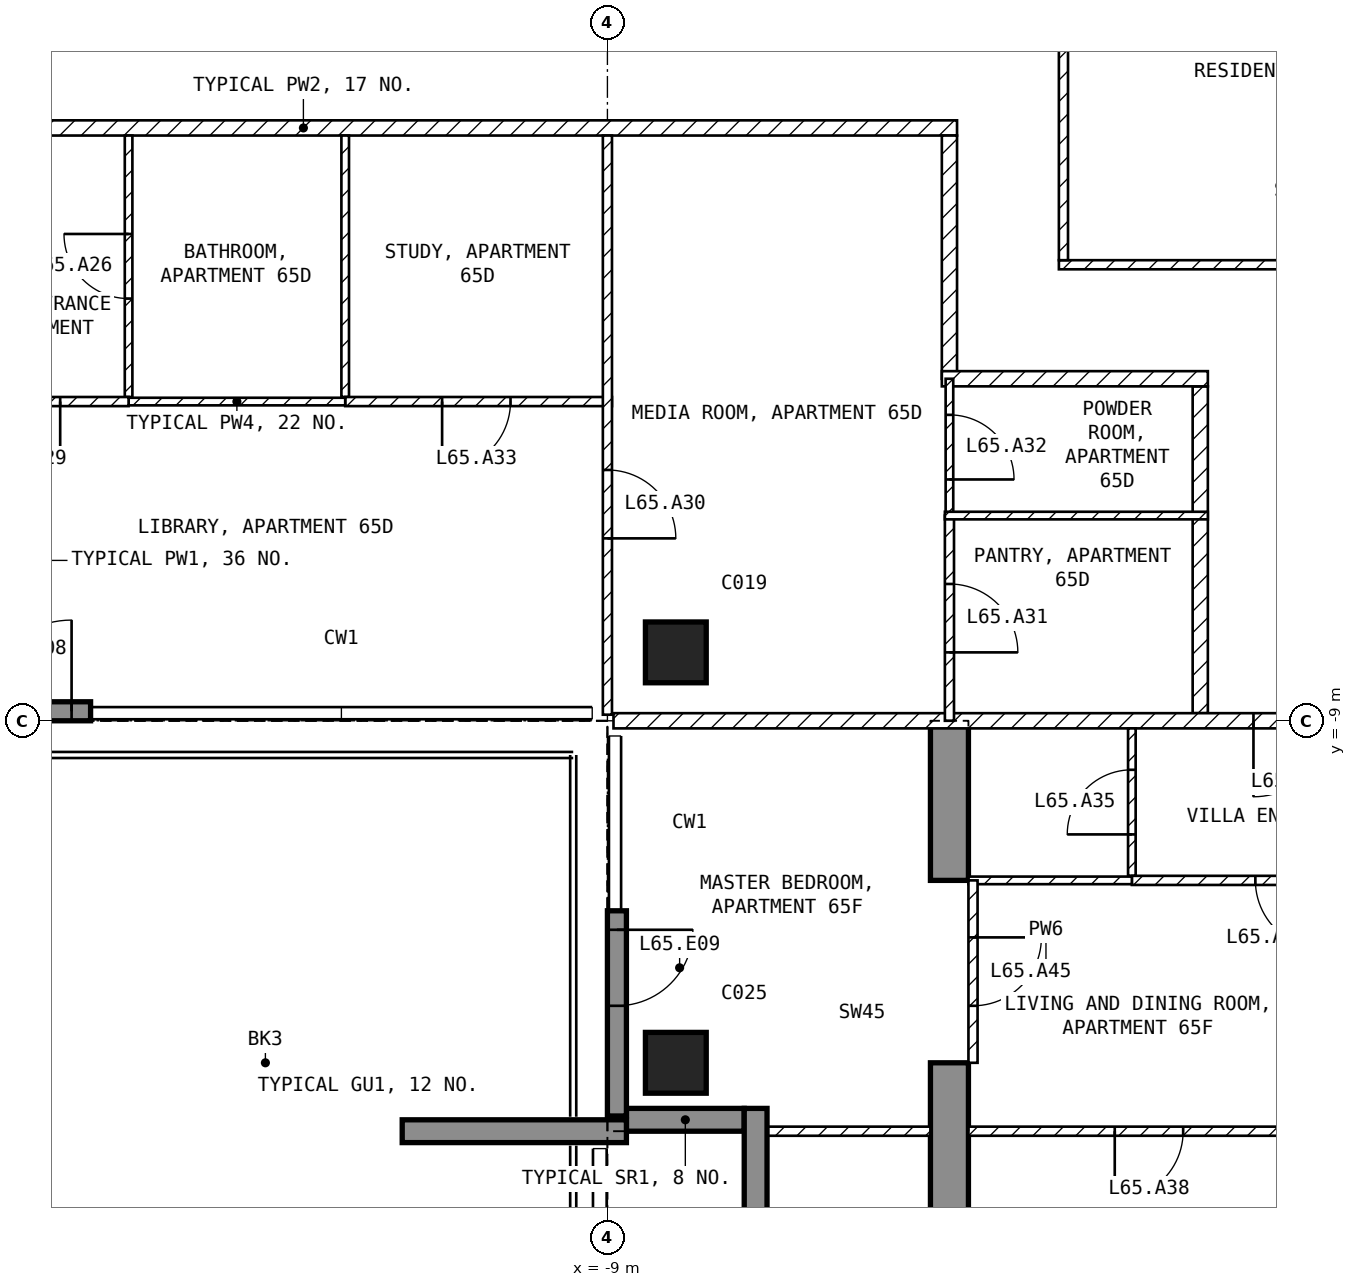
"""IFC4 building model, lengths in metres.
Left out: names, types, materials, properties, quantities, classifications, styles, units other than length and angle.
Written with IfcOpenShell. Run it as: python <this file> out.ifc"""

import sys

from ifc_helpers import new_model, si_unit, direction, frame, frame_2d, origin, origin_2d, place, context, subcontext, project, spatial, polyline, rectangle, outline, extrude, element, fill, save


model = new_model("IFC4")
c1 = context("Model", 3, precision=1e-05, world=origin(), true_north=direction((0.0, 1.0)))
c2 = subcontext(c1, "Body", "Model", "MODEL_VIEW")
j1 = project(units=[si_unit("LENGTHUNIT", "METRE"), si_unit("PLANEANGLEUNIT", "RADIAN")], contexts=[c1])
p1 = place(None, origin())
s1 = spatial("IfcSite", under=j1, at=p1, CompositionType="ELEMENT")
p2 = place(p1, origin())
s2 = spatial("IfcBuilding", under=s1, at=p2, CompositionType="ELEMENT")
p3 = place(p2, frame((0.0, 0.0, 257.0)))
s3 = spatial("IfcBuildingStorey", under=s2, at=p3, CompositionType="ELEMENT", Elevation=257.0)
for number, where, z_axis, x_axis in (
    (1, (-8.1, -13.5, -0.25), (0.0, 0.0, 1.0), (1.0, 0.0, 0.0)),
    (2, (-8.1, -8.1, -0.25), (0.0, 0.0, 1.0), (1.0, 0.0, 0.0)),
):
    element("IfcColumn", number, at=place(p3, frame(where, z_axis=z_axis, x_axis=x_axis)), inside=s3, PredefinedType="COLUMN", context=c2, shape_type="SweptSolid", body=[
        extrude(rectangle(XDim=0.8, YDim=0.8, at=origin_2d()), origin(), (0.0, 0.0, 1.0), 3.5),
    ])
p4 = place(p3, frame((-4.75, -16.7, -0.25), z_axis=(1.0, 0.0, 0.0), x_axis=(0.0, 1.0, 0.0)))
e3 = element("IfcWall", 3, at=p4, inside=s3, PredefinedType="SHEAR", context=c2, shape_type="SweptSolid", body=[
    extrude(outline(polyline([(0.0, 0.0), (3.2, 0.0), (3.2, 2.65), (5.6, 2.65), (5.6, 0.0), (7.7, 0.0), (7.7, 3.5), (0.0, 3.5), (0.0, 0.0)])), origin(), (0.0, 0.0, 1.0), 0.5),
])
p5 = place(p3, frame((-17.94, -8.875, 0.0), z_axis=(0.0, 0.0, 1.0), x_axis=(1.0, 0.0, 0.0)))
e4 = element("IfcWall", 4, at=p5, inside=s3, PredefinedType="SOLIDWALL", context=c2, shape_type="SweptSolid", body=[
    extrude(rectangle(XDim=2.14, YDim=0.25, at=frame_2d((1.07, 0.0))), origin(), (0.0, 0.0, 1.0), 3.25),
])
p6 = place(p5, frame((0.69, 0.0, 0.0)))
e5 = element("IfcOpeningElement", 5, at=p6, cuts=e4, PredefinedType="OPENING", context=c2, shape_type="SweptSolid", body=[
    extrude(rectangle(XDim=1.2, YDim=2.4, at=frame_2d((0.6, 1.2))), frame((0.0, 0.135, 0.0), z_axis=(0.0, -1.0, 0.0), x_axis=(1.0, 0.0, 0.0)), (0.0, 0.0, 1.0), 0.27),
])
p7 = place(p3, frame((-8.875, -11.5, 0.0), z_axis=(0.0, 0.0, 1.0), x_axis=(0.0, -1.0, 0.0)))
e6 = element("IfcWall", 6, at=p7, inside=s3, PredefinedType="SOLIDWALL", context=c2, shape_type="SweptSolid", body=[
    extrude(rectangle(XDim=2.7, YDim=0.25, at=frame_2d((1.35, 0.0))), origin(), (0.0, 0.0, 1.0), 3.25),
])
p8 = place(p7, frame((0.25, 0.0, 0.0)))
e7 = element("IfcOpeningElement", 7, at=p8, cuts=e6, PredefinedType="OPENING", context=c2, shape_type="SweptSolid", body=[
    extrude(rectangle(XDim=1.0, YDim=2.4, at=frame_2d((0.5, 1.2))), frame((0.0, 0.135, 0.0), z_axis=(0.0, -1.0, 0.0), x_axis=(1.0, 0.0, 0.0)), (0.0, 0.0, 1.0), 0.27),
])
p9 = place(p3, frame((-8.75, -14.25, 0.0), z_axis=(0.0, 0.0, 1.0), x_axis=(1.0, 0.0, 0.0)))
e8 = element("IfcWall", 8, at=p9, inside=s3, PredefinedType="SOLIDWALL", context=c2, shape_type="SweptSolid", body=[
    extrude(rectangle(XDim=1.55, YDim=0.3, at=frame_2d((0.775, 0.0))), origin(), (0.0, 0.0, 1.0), 3.25),
])
p10 = place(p3, frame((-7.05, -14.1, 0.0), z_axis=(0.0, 0.0, 1.0), x_axis=(0.0, -1.0, 0.0)))
e9 = element("IfcWall", 9, at=p10, inside=s3, PredefinedType="SOLIDWALL", context=c2, shape_type="SweptSolid", body=[
    extrude(rectangle(XDim=1.8, YDim=0.3, at=frame_2d((0.9, 0.0))), origin(), (0.0, 0.0, 1.0), 3.25),
])
p11 = place(p3, frame((-8.75, -14.4, 0.0), z_axis=(0.0, 0.0, 1.0), x_axis=(-1.0, 0.0, 0.0)))
e10 = element("IfcWall", 10, at=p11, inside=s3, PredefinedType="SOLIDWALL", context=c2, shape_type="SweptSolid", body=[
    extrude(rectangle(XDim=2.95, YDim=0.3, at=frame_2d((1.475, 0.0))), origin(), (0.0, 0.0, 1.0), 3.25),
])
p12 = place(p3, frame((-3.06, -3.0, 0.0), z_axis=(0.0, 0.0, 1.0), x_axis=(1.0, 0.0, 0.0)))
e11 = element("IfcWall", 11, at=p12, inside=s3, PredefinedType="PARTITIONING", context=c2, shape_type="SweptSolid", body=[
    extrude(rectangle(XDim=6.12, YDim=0.12, at=frame_2d((3.06, 0.0))), origin(), (0.0, 0.0, 1.0), 3.25),
])
p13 = place(p3, frame((-3.0, 2.94, 0.0), z_axis=(0.0, 0.0, 1.0), x_axis=(0.0, -1.0, 0.0)))
e12 = element("IfcWall", 12, at=p13, inside=s3, PredefinedType="PARTITIONING", context=c2, shape_type="SweptSolid", body=[
    extrude(rectangle(XDim=5.88, YDim=0.12, at=frame_2d((2.94, 0.0))), origin(), (0.0, 0.0, 1.0), 3.25),
])
p14 = place(p3, frame((-4.4, -1.2, 0.0), z_axis=(0.0, 0.0, 1.0), x_axis=(-1.0, 0.0, 0.0)))
e13 = element("IfcWall", 13, at=p14, inside=s3, PredefinedType="PARTITIONING", context=c2, shape_type="SweptSolid", body=[
    extrude(rectangle(XDim=17.2, YDim=0.2, at=frame_2d((8.6, 0.0))), origin(), (0.0, 0.0, 1.0), 3.25),
])
p15 = place(p14, frame((12.05, 0.0, 0.0)))
e14 = element("IfcOpeningElement", 14, at=p15, cuts=e13, PredefinedType="OPENING", context=c2, shape_type="SweptSolid", body=[
    extrude(rectangle(XDim=1.0, YDim=2.1, at=frame_2d((0.5, 1.05))), frame((0.0, 0.11, 0.0), z_axis=(0.0, -1.0, 0.0), x_axis=(1.0, 0.0, 0.0)), (0.0, 0.0, 1.0), 0.22),
])
p16 = place(p3, frame((-4.5, -4.5, 0.0), z_axis=(0.0, 0.0, 1.0), x_axis=(0.0, 1.0, 0.0)))
e15 = element("IfcWall", 15, at=p16, inside=s3, PredefinedType="PARTITIONING", context=c2, shape_type="SweptSolid", body=[
    extrude(rectangle(XDim=3.2, YDim=0.2, at=frame_2d((1.6, 0.0))), origin(), (0.0, 0.0, 1.0), 3.25),
])
p17 = place(p3, frame((-1.2, -8.9, 0.0), z_axis=(0.0, 0.0, 1.0), x_axis=(0.0, 1.0, 0.0)))
e16 = element("IfcWall", 16, at=p17, inside=s3, PredefinedType="PARTITIONING", context=c2, shape_type="SweptSolid", body=[
    extrude(rectangle(XDim=4.3, YDim=0.2, at=frame_2d((2.15, 0.0))), origin(), (0.0, 0.0, 1.0), 3.25),
])
p18 = place(p3, frame((-1.1, -4.5, 0.0), z_axis=(0.0, 0.0, 1.0), x_axis=(-1.0, 0.0, 0.0)))
e17 = element("IfcWall", 17, at=p18, inside=s3, PredefinedType="PARTITIONING", context=c2, shape_type="SweptSolid", body=[
    extrude(rectangle(XDim=3.5, YDim=0.2, at=frame_2d((1.75, 0.0))), origin(), (0.0, 0.0, 1.0), 3.25),
])
p19 = place(p3, frame((8.92, -9.0, 0.0), z_axis=(0.0, 0.0, 1.0), x_axis=(-1.0, 0.0, 0.0)))
e18 = element("IfcWall", 18, at=p19, inside=s3, PredefinedType="PARTITIONING", context=c2, shape_type="SweptSolid", body=[
    extrude(rectangle(XDim=17.84, YDim=0.2, at=frame_2d((8.92, 0.0))), origin(), (0.0, 0.0, 1.0), 3.25),
])
p20 = place(p19, frame((8.42, 0.0, 0.0)))
e19 = element("IfcOpeningElement", 19, at=p20, cuts=e18, PredefinedType="OPENING", context=c2, shape_type="SweptSolid", body=[
    extrude(rectangle(XDim=1.0, YDim=2.1, at=frame_2d((0.5, 1.05))), frame((0.0, 0.11, 0.0), z_axis=(0.0, -1.0, 0.0), x_axis=(1.0, 0.0, 0.0)), (0.0, 0.0, 1.0), 0.22),
])
p21 = place(p3, frame((-12.45, -4.74, 0.0), z_axis=(0.0, 0.0, 1.0), x_axis=(0.0, 1.0, 0.0)))
e20 = element("IfcWall", 20, at=p21, inside=s3, PredefinedType="PARTITIONING", context=c2, shape_type="SweptSolid", body=[
    extrude(rectangle(XDim=3.44, YDim=0.1, at=frame_2d((1.72, 0.0))), origin(), (0.0, 0.0, 1.0), 3.25),
])
p22 = place(p3, frame((-8.94, -4.8, 0.0), z_axis=(0.0, 0.0, 1.0), x_axis=(-1.0, 0.0, 0.0)))
e21 = element("IfcWall", 21, at=p22, inside=s3, PredefinedType="PARTITIONING", context=c2, shape_type="SweptSolid", body=[
    extrude(rectangle(XDim=3.51, YDim=0.12, at=frame_2d((1.755, 0.0))), origin(), (0.0, 0.0, 1.0), 3.25),
])
p23 = place(p22, frame((1.335, 0.0, 0.0)))
e22 = element("IfcOpeningElement", 22, at=p23, cuts=e21, PredefinedType="OPENING", context=c2, shape_type="SweptSolid", body=[
    extrude(rectangle(XDim=0.9, YDim=2.1, at=frame_2d((0.45, 1.05))), frame((0.0, 0.07, 0.0), z_axis=(0.0, -1.0, 0.0), x_axis=(1.0, 0.0, 0.0)), (0.0, 0.0, 1.0), 0.14),
])
p24 = place(p3, frame((-9.0, -1.3, 0.0), z_axis=(0.0, 0.0, 1.0), x_axis=(0.0, -1.0, 0.0)))
e23 = element("IfcWall", 23, at=p24, inside=s3, PredefinedType="PARTITIONING", context=c2, shape_type="SweptSolid", body=[
    extrude(rectangle(XDim=7.62, YDim=0.12, at=frame_2d((3.81, 0.0))), origin(), (0.0, 0.0, 1.0), 3.25),
])
p25 = place(p24, frame((4.4, 0.0, 0.0)))
e24 = element("IfcOpeningElement", 24, at=p25, cuts=e23, PredefinedType="OPENING", context=c2, shape_type="SweptSolid", body=[
    extrude(rectangle(XDim=0.9, YDim=2.1, at=frame_2d((0.45, 1.05))), frame((0.0, 0.07, 0.0), z_axis=(0.0, -1.0, 0.0), x_axis=(1.0, 0.0, 0.0)), (0.0, 0.0, 1.0), 0.14),
])
p26 = place(p3, frame((-15.3, -4.74, 0.0), z_axis=(0.0, 0.0, 1.0), x_axis=(0.0, 1.0, 0.0)))
e25 = element("IfcWall", 25, at=p26, inside=s3, PredefinedType="PARTITIONING", context=c2, shape_type="SweptSolid", body=[
    extrude(rectangle(XDim=3.44, YDim=0.1, at=frame_2d((1.72, 0.0))), origin(), (0.0, 0.0, 1.0), 3.25),
])
p27 = place(p26, frame((1.295, 0.0, 0.0)))
e26 = element("IfcOpeningElement", 26, at=p27, cuts=e25, PredefinedType="OPENING", context=c2, shape_type="SweptSolid", body=[
    extrude(rectangle(XDim=0.85, YDim=2.1, at=frame_2d((0.425, 1.05))), frame((0.0, 0.06, 0.0), z_axis=(0.0, -1.0, 0.0), x_axis=(1.0, 0.0, 0.0)), (0.0, 0.0, 1.0), 0.12),
])
p28 = place(p3, frame((-12.45, -4.8, 0.0), z_axis=(0.0, 0.0, 1.0), x_axis=(-1.0, 0.0, 0.0)))
e27 = element("IfcWall", 27, at=p28, inside=s3, PredefinedType="PARTITIONING", context=c2, shape_type="SweptSolid", body=[
    extrude(rectangle(XDim=2.85, YDim=0.1, at=frame_2d((1.425, 0.0))), origin(), (0.0, 0.0, 1.0), 3.25),
])
p29 = place(p3, frame((-15.3, -4.8, 0.0), z_axis=(0.0, 0.0, 1.0), x_axis=(-1.0, 0.0, 0.0)))
e28 = element("IfcWall", 28, at=p29, inside=s3, PredefinedType="PARTITIONING", context=c2, shape_type="SweptSolid", body=[
    extrude(rectangle(XDim=6.3, YDim=0.12, at=frame_2d((3.15, 0.0))), origin(), (0.0, 0.0, 1.0), 3.25),
])
p30 = place(p29, frame((0.9, 0.0, 0.0)))
e29 = element("IfcOpeningElement", 29, at=p30, cuts=e28, PredefinedType="OPENING", context=c2, shape_type="SweptSolid", body=[
    extrude(rectangle(XDim=0.9, YDim=2.1, at=frame_2d((0.45, 1.05))), frame((0.0, 0.07, 0.0), z_axis=(0.0, -1.0, 0.0), x_axis=(1.0, 0.0, 0.0)), (0.0, 0.0, 1.0), 0.14),
])
p31 = place(p3, frame((-4.5, -4.5, 0.0), z_axis=(0.0, 0.0, 1.0), x_axis=(0.0, -1.0, 0.0)))
e30 = element("IfcWall", 30, at=p31, inside=s3, PredefinedType="PARTITIONING", context=c2, shape_type="SweptSolid", body=[
    extrude(rectangle(XDim=1.8, YDim=0.1, at=frame_2d((0.9, 0.0))), origin(), (0.0, 0.0, 1.0), 3.25),
])
p32 = place(p31, frame((0.475, 0.0, 0.0)))
e31 = element("IfcOpeningElement", 31, at=p32, cuts=e30, PredefinedType="OPENING", context=c2, shape_type="SweptSolid", body=[
    extrude(rectangle(XDim=0.85, YDim=2.1, at=frame_2d((0.425, 1.05))), frame((0.0, 0.06, 0.0), z_axis=(0.0, -1.0, 0.0), x_axis=(1.0, 0.0, 0.0)), (0.0, 0.0, 1.0), 0.12),
])
p33 = place(p3, frame((-4.5, -6.3, 0.0), z_axis=(0.0, 0.0, 1.0), x_axis=(0.0, -1.0, 0.0)))
e32 = element("IfcWall", 32, at=p33, inside=s3, PredefinedType="PARTITIONING", context=c2, shape_type="SweptSolid", body=[
    extrude(rectangle(XDim=2.7, YDim=0.12, at=frame_2d((1.35, 0.0))), origin(), (0.0, 0.0, 1.0), 3.25),
])
p34 = place(p33, frame((0.9, 0.0, 0.0)))
e33 = element("IfcOpeningElement", 33, at=p34, cuts=e32, PredefinedType="OPENING", context=c2, shape_type="SweptSolid", body=[
    extrude(rectangle(XDim=0.9, YDim=2.1, at=frame_2d((0.45, 1.05))), frame((0.0, 0.07, 0.0), z_axis=(0.0, -1.0, 0.0), x_axis=(1.0, 0.0, 0.0)), (0.0, 0.0, 1.0), 0.14),
])
p35 = place(p3, frame((-1.1, -6.3, 0.0), z_axis=(0.0, 0.0, 1.0), x_axis=(-1.0, 0.0, 0.0)))
e34 = element("IfcWall", 34, at=p35, inside=s3, PredefinedType="PARTITIONING", context=c2, shape_type="SweptSolid", body=[
    extrude(rectangle(XDim=3.46, YDim=0.1, at=frame_2d((1.73, 0.0))), origin(), (0.0, 0.0, 1.0), 3.25),
])
p36 = place(p3, frame((-2.1, -11.04, 0.0), z_axis=(0.0, 0.0, 1.0), x_axis=(0.0, 1.0, 0.0)))
e35 = element("IfcWall", 35, at=p36, inside=s3, PredefinedType="PARTITIONING", context=c2, shape_type="SweptSolid", body=[
    extrude(rectangle(XDim=1.94, YDim=0.1, at=frame_2d((0.97, 0.0))), origin(), (0.0, 0.0, 1.0), 3.25),
])
p37 = place(p36, frame((0.545, 0.0, 0.0)))
e36 = element("IfcOpeningElement", 36, at=p37, cuts=e35, PredefinedType="OPENING", context=c2, shape_type="SweptSolid", body=[
    extrude(rectangle(XDim=0.85, YDim=2.1, at=frame_2d((0.425, 1.05))), frame((0.0, 0.06, 0.0), z_axis=(0.0, -1.0, 0.0), x_axis=(1.0, 0.0, 0.0)), (0.0, 0.0, 1.0), 0.12),
])
p38 = place(p3, frame((4.25, -11.1, 0.0), z_axis=(0.0, 0.0, 1.0), x_axis=(-1.0, 0.0, 0.0)))
e37 = element("IfcWall", 37, at=p38, inside=s3, PredefinedType="PARTITIONING", context=c2, shape_type="SweptSolid", body=[
    extrude(rectangle(XDim=6.35, YDim=0.12, at=frame_2d((3.175, 0.0))), origin(), (0.0, 0.0, 1.0), 3.25),
])
p39 = place(p38, frame((3.825, 0.0, 0.0)))
e38 = element("IfcOpeningElement", 38, at=p39, cuts=e37, PredefinedType="OPENING", context=c2, shape_type="SweptSolid", body=[
    extrude(rectangle(XDim=0.9, YDim=2.1, at=frame_2d((0.45, 1.05))), frame((0.0, 0.07, 0.0), z_axis=(0.0, -1.0, 0.0), x_axis=(1.0, 0.0, 0.0)), (0.0, 0.0, 1.0), 0.14),
])
p40 = place(p3, frame((-2.1, -11.1, 0.0), z_axis=(0.0, 0.0, 1.0), x_axis=(-1.0, 0.0, 0.0)))
e39 = element("IfcWall", 39, at=p40, inside=s3, PredefinedType="PARTITIONING", context=c2, shape_type="SweptSolid", body=[
    extrude(rectangle(XDim=2.15, YDim=0.1, at=frame_2d((1.075, 0.0))), origin(), (0.0, 0.0, 1.0), 3.25),
])
p41 = place(p3, frame((4.25, -14.4, 0.0), z_axis=(0.0, 0.0, 1.0), x_axis=(-1.0, 0.0, 0.0)))
e40 = element("IfcWall", 40, at=p41, inside=s3, PredefinedType="PARTITIONING", context=c2, shape_type="SweptSolid", body=[
    extrude(rectangle(XDim=8.5, YDim=0.12, at=frame_2d((4.25, 0.0))), origin(), (0.0, 0.0, 1.0), 3.25),
])
p42 = place(p41, frame((5.675, 0.0, 0.0)))
e41 = element("IfcOpeningElement", 41, at=p42, cuts=e40, PredefinedType="OPENING", context=c2, shape_type="SweptSolid", body=[
    extrude(rectangle(XDim=0.9, YDim=2.1, at=frame_2d((0.45, 1.05))), frame((0.0, 0.07, 0.0), z_axis=(0.0, -1.0, 0.0), x_axis=(1.0, 0.0, 0.0)), (0.0, 0.0, 1.0), 0.14),
])
p43 = place(p3, frame((-4.75, -14.4, 0.0), z_axis=(0.0, 0.0, 1.0), x_axis=(-1.0, 0.0, 0.0)))
e42 = element("IfcWall", 42, at=p43, inside=s3, PredefinedType="PARTITIONING", context=c2, shape_type="SweptSolid", body=[
    extrude(rectangle(XDim=2.37, YDim=0.12, at=frame_2d((1.185, 0.0))), origin(), (0.0, 0.0, 1.0), 3.25),
])
p44 = place(p3, frame((-4.19, -11.1, 0.0), z_axis=(0.0, 0.0, 1.0), x_axis=(0.0, -1.0, 0.0)))
e43 = element("IfcWall", 43, at=p44, inside=s3, PredefinedType="PARTITIONING", context=c2, shape_type="SweptSolid", body=[
    extrude(rectangle(XDim=2.4, YDim=0.12, at=frame_2d((1.2, 0.0))), origin(), (0.0, 0.0, 1.0), 2.4),
])
p45 = place(p44, frame((0.75, 0.0, 0.0)))
e44 = element("IfcOpeningElement", 44, at=p45, cuts=e43, PredefinedType="OPENING", context=c2, shape_type="SweptSolid", body=[
    extrude(rectangle(XDim=0.9, YDim=2.1, at=frame_2d((0.45, 1.05))), frame((0.0, 0.07, 0.0), z_axis=(0.0, -1.0, 0.0), x_axis=(1.0, 0.0, 0.0)), (0.0, 0.0, 1.0), 0.14),
])
p46 = place(p6, origin())
e45 = element("IfcDoor", 45, at=p46, inside=s3, OperationType="SINGLE_SWING_RIGHT", PredefinedType="DOOR", context=c2, shape_type="SweptSolid", body=[
    extrude(rectangle(XDim=1.2, YDim=2.4, at=frame_2d((0.6, 1.2))), frame((0.0, 0.025, 0.0), z_axis=(0.0, -1.0, 0.0), x_axis=(1.0, 0.0, 0.0)), (0.0, 0.0, 1.0), 0.05),
])
fill(e5, e45)
p47 = place(p8, origin())
e46 = element("IfcDoor", 46, at=p47, inside=s3, OperationType="SINGLE_SWING_LEFT", PredefinedType="DOOR", context=c2, shape_type="SweptSolid", body=[
    extrude(rectangle(XDim=1.0, YDim=2.4, at=frame_2d((0.5, 1.2))), frame((0.0, 0.025, 0.0), z_axis=(0.0, -1.0, 0.0), x_axis=(1.0, 0.0, 0.0)), (0.0, 0.0, 1.0), 0.05),
])
fill(e7, e46)
p48 = place(p27, origin())
e47 = element("IfcDoor", 47, at=p48, inside=s3, OperationType="SINGLE_SWING_RIGHT", PredefinedType="DOOR", context=c2, shape_type="SweptSolid", body=[
    extrude(rectangle(XDim=0.85, YDim=2.1, at=frame_2d((0.425, 1.05))), frame((0.0, 0.025, 0.0), z_axis=(0.0, -1.0, 0.0), x_axis=(1.0, 0.0, 0.0)), (0.0, 0.0, 1.0), 0.05),
])
fill(e26, e47)
p49 = place(p30, origin())
e48 = element("IfcDoor", 48, at=p49, inside=s3, OperationType="SINGLE_SWING_LEFT", PredefinedType="DOOR", context=c2, shape_type="SweptSolid", body=[
    extrude(rectangle(XDim=0.9, YDim=2.1, at=frame_2d((0.45, 1.05))), frame((0.0, 0.025, 0.0), z_axis=(0.0, -1.0, 0.0), x_axis=(1.0, 0.0, 0.0)), (0.0, 0.0, 1.0), 0.05),
])
fill(e29, e48)
p50 = place(p25, origin())
e49 = element("IfcDoor", 49, at=p50, inside=s3, OperationType="SINGLE_SWING_RIGHT", PredefinedType="DOOR", context=c2, shape_type="SweptSolid", body=[
    extrude(rectangle(XDim=0.9, YDim=2.1, at=frame_2d((0.45, 1.05))), frame((0.0, 0.025, 0.0), z_axis=(0.0, -1.0, 0.0), x_axis=(1.0, 0.0, 0.0)), (0.0, 0.0, 1.0), 0.05),
])
fill(e24, e49)
p51 = place(p34, origin())
e50 = element("IfcDoor", 50, at=p51, inside=s3, OperationType="SINGLE_SWING_RIGHT", PredefinedType="DOOR", context=c2, shape_type="SweptSolid", body=[
    extrude(rectangle(XDim=0.9, YDim=2.1, at=frame_2d((0.45, 1.05))), frame((0.0, 0.025, 0.0), z_axis=(0.0, -1.0, 0.0), x_axis=(1.0, 0.0, 0.0)), (0.0, 0.0, 1.0), 0.05),
])
fill(e33, e50)
p52 = place(p32, origin())
e51 = element("IfcDoor", 51, at=p52, inside=s3, OperationType="SINGLE_SWING_RIGHT", PredefinedType="DOOR", context=c2, shape_type="SweptSolid", body=[
    extrude(rectangle(XDim=0.85, YDim=2.1, at=frame_2d((0.425, 1.05))), frame((0.0, 0.025, 0.0), z_axis=(0.0, -1.0, 0.0), x_axis=(1.0, 0.0, 0.0)), (0.0, 0.0, 1.0), 0.05),
])
fill(e31, e51)
p53 = place(p23, origin())
e52 = element("IfcDoor", 52, at=p53, inside=s3, OperationType="SINGLE_SWING_RIGHT", PredefinedType="DOOR", context=c2, shape_type="SweptSolid", body=[
    extrude(rectangle(XDim=0.9, YDim=2.1, at=frame_2d((0.45, 1.05))), frame((0.0, 0.025, 0.0), z_axis=(0.0, -1.0, 0.0), x_axis=(1.0, 0.0, 0.0)), (0.0, 0.0, 1.0), 0.05),
])
fill(e22, e52)
p54 = place(p20, origin())
e53 = element("IfcDoor", 53, at=p54, inside=s3, OperationType="SINGLE_SWING_RIGHT", PredefinedType="DOOR", context=c2, shape_type="SweptSolid", body=[
    extrude(rectangle(XDim=1.0, YDim=2.1, at=frame_2d((0.5, 1.05))), frame((0.0, 0.025, 0.0), z_axis=(0.0, -1.0, 0.0), x_axis=(1.0, 0.0, 0.0)), (0.0, 0.0, 1.0), 0.05),
])
fill(e19, e53)
p55 = place(p37, origin())
e54 = element("IfcDoor", 54, at=p55, inside=s3, OperationType="SINGLE_SWING_LEFT", PredefinedType="DOOR", context=c2, shape_type="SweptSolid", body=[
    extrude(rectangle(XDim=0.85, YDim=2.1, at=frame_2d((0.425, 1.05))), frame((0.0, 0.025, 0.0), z_axis=(0.0, -1.0, 0.0), x_axis=(1.0, 0.0, 0.0)), (0.0, 0.0, 1.0), 0.05),
])
fill(e36, e54)
p56 = place(p39, origin())
e55 = element("IfcDoor", 55, at=p56, inside=s3, OperationType="SINGLE_SWING_LEFT", PredefinedType="DOOR", context=c2, shape_type="SweptSolid", body=[
    extrude(rectangle(XDim=0.9, YDim=2.1, at=frame_2d((0.45, 1.05))), frame((0.0, 0.025, 0.0), z_axis=(0.0, -1.0, 0.0), x_axis=(1.0, 0.0, 0.0)), (0.0, 0.0, 1.0), 0.05),
])
fill(e38, e55)
p57 = place(p42, origin())
e56 = element("IfcDoor", 56, at=p57, inside=s3, OperationType="SINGLE_SWING_RIGHT", PredefinedType="DOOR", context=c2, shape_type="SweptSolid", body=[
    extrude(rectangle(XDim=0.9, YDim=2.1, at=frame_2d((0.45, 1.05))), frame((0.0, 0.025, 0.0), z_axis=(0.0, -1.0, 0.0), x_axis=(1.0, 0.0, 0.0)), (0.0, 0.0, 1.0), 0.05),
])
fill(e41, e56)
p58 = place(p45, origin())
e57 = element("IfcDoor", 57, at=p58, inside=s3, OperationType="SINGLE_SWING_LEFT", PredefinedType="DOOR", context=c2, shape_type="SweptSolid", body=[
    extrude(rectangle(XDim=0.9, YDim=2.1, at=frame_2d((0.45, 1.05))), frame((0.0, 0.025, 0.0), z_axis=(0.0, -1.0, 0.0), x_axis=(1.0, 0.0, 0.0)), (0.0, 0.0, 1.0), 0.05),
])
fill(e44, e57)
save(model, sys.argv[1])
